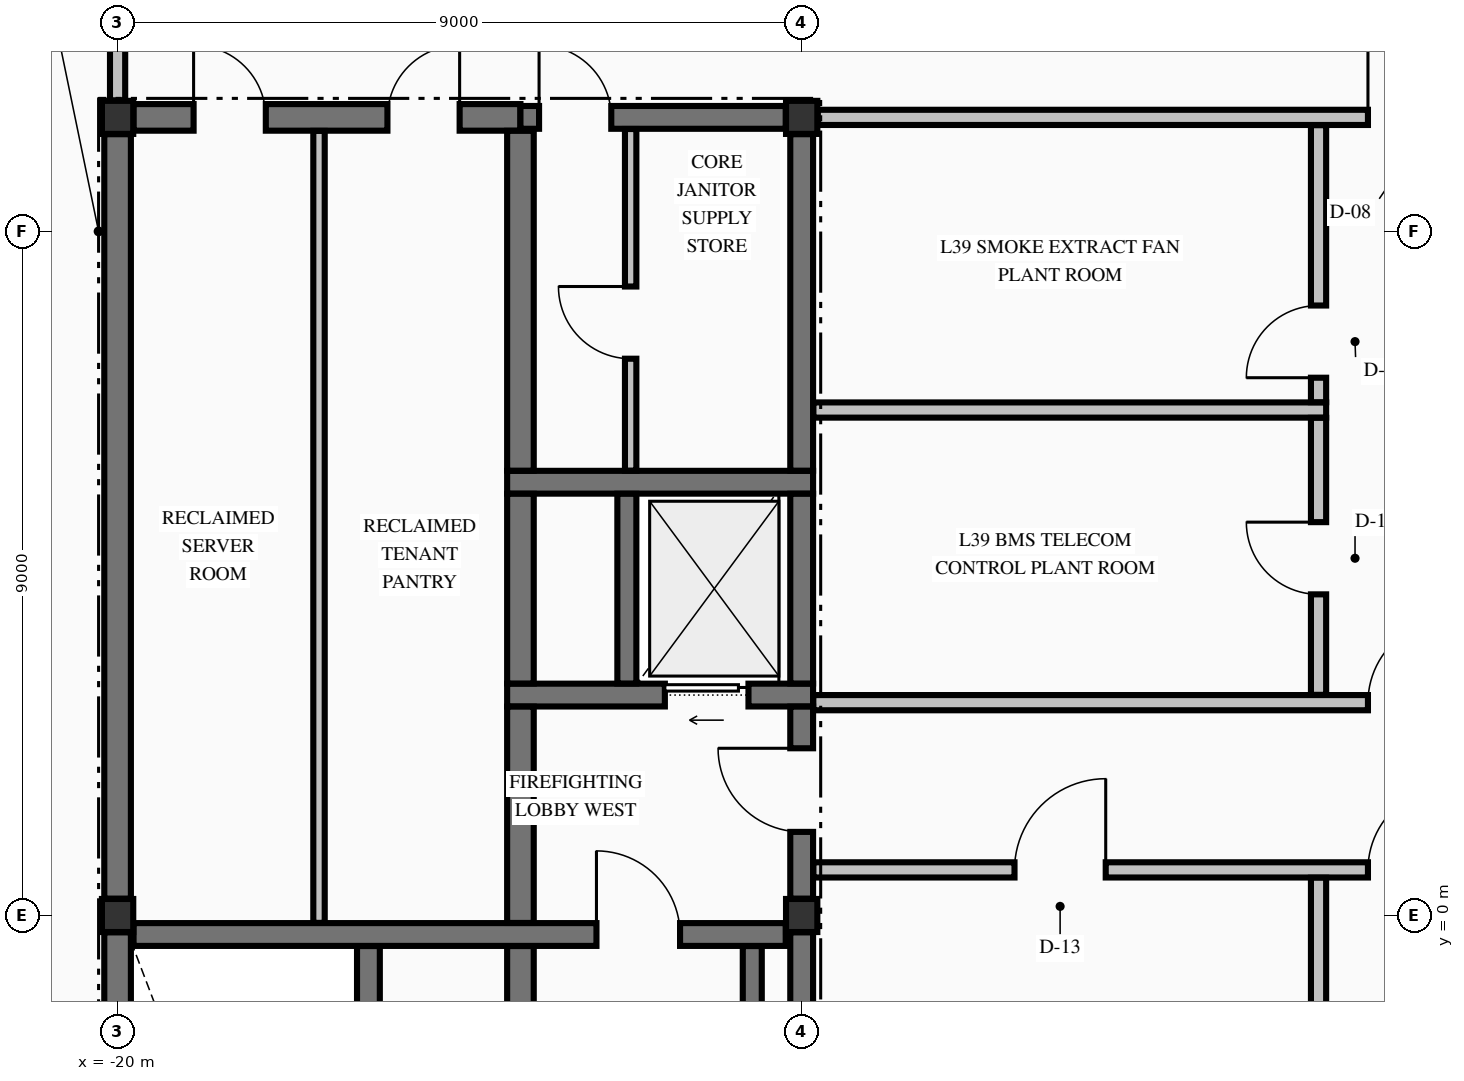
"""IFC4 building model, lengths in metres.
Left out: names, types, materials, properties, quantities, classifications, styles, units other than length and angle.
Written with IfcOpenShell. Run it as: python <this file> out.ifc"""

import sys

from ifc_helpers import new_model, si_unit, direction, frame, frame_2d, origin, origin_2d, place, context, subcontext, project, spatial, rectangle, i_section, extrude, element, fill, save


model = new_model("IFC4")
c1 = context("Model", 3, precision=1e-05, world=origin(), true_north=direction((0.0, 1.0)))
c2 = subcontext(c1, "Body", "Model", "MODEL_VIEW")
j1 = project(units=[si_unit("LENGTHUNIT", "METRE"), si_unit("PLANEANGLEUNIT", "RADIAN")], contexts=[c1])
p1 = place(None, origin())
s1 = spatial("IfcSite", under=j1, at=p1, CompositionType="ELEMENT")
p2 = place(p1, origin())
s2 = spatial("IfcBuilding", under=s1, at=p2, CompositionType="ELEMENT")
p3 = place(p2, frame((0.0, 0.0, 153.48)))
s3 = spatial("IfcBuildingStorey", under=s2, at=p3, CompositionType="ELEMENT", Elevation=153.48)
for number, where, z_axis, x_axis in (
    (1, (-20.0, 10.5, -0.425), (0.0, 0.0, 1.0), (1.0, 0.0, 0.0)),
    (2, (-11.0, 0.0, -0.425), (0.0, 0.0, 1.0), (1.0, 0.0, 0.0)),
    (3, (-11.0, 10.5, -0.425), (0.0, 0.0, 1.0), (1.0, 0.0, 0.0)),
    (4, (-20.0, 0.0, -0.425), (0.0, 0.0, 1.0), (1.0, 0.0, 0.0)),
):
    element("IfcColumn", number, at=place(p3, frame(where, z_axis=z_axis, x_axis=x_axis)), inside=s3, PredefinedType="COLUMN", context=c2, shape_type="SweptSolid", body=[
        extrude(i_section(OverallWidth=0.412, OverallDepth=0.435, WebThickness=0.036, FlangeThickness=0.058, FilletRadius=0.015, at=origin_2d()), origin(), (0.0, 0.0, 1.0), 4.76),
    ])
p4 = place(p3, frame((-19.79, -0.25, 0.0), z_axis=(0.0, 0.0, 1.0), x_axis=(1.0, 0.0, 0.0)))
e5 = element("IfcWall", 5, at=p4, inside=s3, PredefinedType="SHEAR", context=c2, shape_type="SweptSolid", body=[
    extrude(rectangle(XDim=8.58, YDim=0.3, at=frame_2d((4.29, 0.0))), origin(), (0.0, 0.0, 1.0), 4.335),
])
p5 = place(p4, frame((6.09, 0.0, 0.0)))
e6 = element("IfcOpeningElement", 6, at=p5, cuts=e5, PredefinedType="OPENING", context=c2, shape_type="SweptSolid", body=[
    extrude(rectangle(XDim=1.1, YDim=2.15, at=frame_2d((0.55, 1.075))), frame((0.0, 0.16, 0.0), z_axis=(0.0, -1.0, 0.0), x_axis=(1.0, 0.0, 0.0)), (0.0, 0.0, 1.0), 0.32),
])
p6 = place(p3, frame((-14.875, 2.9, 0.0), z_axis=(0.0, 0.0, 1.0), x_axis=(1.0, 0.0, 0.0)))
e7 = element("IfcWall", 7, at=p6, inside=s3, PredefinedType="SHEAR", context=c2, shape_type="SweptSolid", body=[
    extrude(rectangle(XDim=4.025, YDim=0.3, at=frame_2d((2.012, 0.0))), origin(), (0.0, 0.0, 1.0), 4.335),
])
p7 = place(p6, frame((2.075, 0.0, 0.0)))
e8 = element("IfcOpeningElement", 8, at=p7, cuts=e7, PredefinedType="OPENING", context=c2, shape_type="SweptSolid", body=[
    extrude(rectangle(XDim=1.1, YDim=2.2, at=frame_2d((0.55, 1.1))), frame((0.0, 0.16, 0.0), z_axis=(0.0, -1.0, 0.0), x_axis=(1.0, 0.0, 0.0)), (0.0, 0.0, 1.0), 0.32),
])
p8 = place(p3, frame((-14.875, 5.7, 0.0), z_axis=(0.0, 0.0, 1.0), x_axis=(1.0, 0.0, 0.0)))
e9 = element("IfcWall", 9, at=p8, inside=s3, PredefinedType="SHEAR", context=c2, shape_type="SweptSolid", body=[
    extrude(rectangle(XDim=4.025, YDim=0.3, at=frame_2d((2.012, 0.0))), origin(), (0.0, 0.0, 1.0), 4.335),
])
p9 = place(p3, frame((-19.79, 10.5, 0.0), z_axis=(0.0, 0.0, 1.0), x_axis=(1.0, 0.0, 0.0)))
e10 = element("IfcWall", 10, at=p9, inside=s3, PredefinedType="SHEAR", context=c2, shape_type="SweptSolid", body=[
    extrude(rectangle(XDim=5.09, YDim=0.35, at=frame_2d((2.545, 0.0))), origin(), (0.0, 0.0, 1.0), 4.335),
])
p10 = place(p9, frame((0.79, 0.0, 0.0)))
e11 = element("IfcOpeningElement", 11, at=p10, cuts=e10, PredefinedType="OPENING", context=c2, shape_type="SweptSolid", body=[
    extrude(rectangle(XDim=0.95, YDim=2.02, at=frame_2d((0.475, 1.01))), frame((0.0, 0.185, 0.0), z_axis=(0.0, -1.0, 0.0), x_axis=(1.0, 0.0, 0.0)), (0.0, 0.0, 1.0), 0.37),
])
p11 = place(p9, frame((3.34, 0.0, 0.0)))
e12 = element("IfcOpeningElement", 12, at=p11, cuts=e10, PredefinedType="OPENING", context=c2, shape_type="SweptSolid", body=[
    extrude(rectangle(XDim=0.95, YDim=2.02, at=frame_2d((0.475, 1.01))), frame((0.0, 0.185, 0.0), z_axis=(0.0, -1.0, 0.0), x_axis=(1.0, 0.0, 0.0)), (0.0, 0.0, 1.0), 0.37),
])
p12 = place(p3, frame((-14.7, 10.5, 0.0), z_axis=(0.0, 0.0, 1.0), x_axis=(1.0, 0.0, 0.0)))
e13 = element("IfcWall", 13, at=p12, inside=s3, PredefinedType="SHEAR", context=c2, shape_type="SweptSolid", body=[
    extrude(rectangle(XDim=3.49, YDim=0.3, at=frame_2d((1.745, 0.0))), origin(), (0.0, 0.0, 1.0), 4.335),
])
p13 = place(p12, frame((0.245, 0.0, 0.0)))
e14 = element("IfcOpeningElement", 14, at=p13, cuts=e13, PredefinedType="OPENING", context=c2, shape_type="SweptSolid", body=[
    extrude(rectangle(XDim=0.95, YDim=2.02, at=frame_2d((0.475, 1.01))), frame((0.0, 0.16, 0.0), z_axis=(0.0, -1.0, 0.0), x_axis=(1.0, 0.0, 0.0)), (0.0, 0.0, 1.0), 0.32),
])
p14 = place(p3, frame((-10.847, 0.6, 0.0), z_axis=(0.0, 0.0, 1.0), x_axis=(1.0, 0.0, 0.0)))
e15 = element("IfcWall", 15, at=p14, inside=s3, PredefinedType="PARTITIONING", context=c2, shape_type="SweptSolid", body=[
    extrude(rectangle(XDim=21.694, YDim=0.2, at=frame_2d((10.847, 0.0))), origin(), (0.0, 0.0, 1.0), 4.335),
])
p15 = place(p14, frame((7.297, 0.0, 0.0)))
e16 = element("IfcOpeningElement", 16, at=p15, cuts=e15, PredefinedType="OPENING", context=c2, shape_type="SweptSolid", body=[
    extrude(rectangle(XDim=1.1, YDim=2.15, at=frame_2d((0.55, 1.075))), frame((0.0, 0.11, 0.0), z_axis=(0.0, -1.0, 0.0), x_axis=(1.0, 0.0, 0.0)), (0.0, 0.0, 1.0), 0.22),
])
p16 = place(p14, frame((2.647, 0.0, 0.0)))
e17 = element("IfcOpeningElement", 17, at=p16, cuts=e15, PredefinedType="OPENING", context=c2, shape_type="SweptSolid", body=[
    extrude(rectangle(XDim=1.2, YDim=2.15, at=frame_2d((0.6, 1.075))), frame((0.0, 0.11, 0.0), z_axis=(0.0, -1.0, 0.0), x_axis=(1.0, 0.0, 0.0)), (0.0, 0.0, 1.0), 0.22),
])
p17 = place(p14, frame((14.847, 0.0, 0.0)))
e18 = element("IfcOpeningElement", 18, at=p17, cuts=e15, PredefinedType="OPENING", context=c2, shape_type="SweptSolid", body=[
    extrude(rectangle(XDim=1.2, YDim=2.15, at=frame_2d((0.6, 1.075))), frame((0.0, 0.11, 0.0), z_axis=(0.0, -1.0, 0.0), x_axis=(1.0, 0.0, 0.0)), (0.0, 0.0, 1.0), 0.22),
])
p18 = place(p3, frame((-10.847, 2.8, 0.0), z_axis=(0.0, 0.0, 1.0), x_axis=(1.0, 0.0, 0.0)))
e19 = element("IfcWall", 19, at=p18, inside=s3, PredefinedType="PARTITIONING", context=c2, shape_type="SweptSolid", body=[
    extrude(rectangle(XDim=21.694, YDim=0.2, at=frame_2d((10.847, 0.0))), origin(), (0.0, 0.0, 1.0), 4.335),
])
p19 = place(p18, frame((7.297, 0.0, 0.0)))
e20 = element("IfcOpeningElement", 20, at=p19, cuts=e19, PredefinedType="OPENING", context=c2, shape_type="SweptSolid", body=[
    extrude(rectangle(XDim=1.1, YDim=2.15, at=frame_2d((0.55, 1.075))), frame((0.0, 0.11, 0.0), z_axis=(0.0, -1.0, 0.0), x_axis=(1.0, 0.0, 0.0)), (0.0, 0.0, 1.0), 0.22),
])
p20 = place(p18, frame((17.497, 0.0, 0.0)))
e21 = element("IfcOpeningElement", 21, at=p20, cuts=e19, PredefinedType="OPENING", context=c2, shape_type="SweptSolid", body=[
    extrude(rectangle(XDim=1.1, YDim=2.15, at=frame_2d((0.55, 1.075))), frame((0.0, 0.11, 0.0), z_axis=(0.0, -1.0, 0.0), x_axis=(1.0, 0.0, 0.0)), (0.0, 0.0, 1.0), 0.22),
])
p21 = place(p3, frame((-10.847, 6.65, 0.0), z_axis=(0.0, 0.0, 1.0), x_axis=(1.0, 0.0, 0.0)))
e22 = element("IfcWall", 22, at=p21, inside=s3, PredefinedType="PARTITIONING", context=c2, shape_type="SweptSolid", body=[
    extrude(rectangle(XDim=6.747, YDim=0.2, at=frame_2d((3.374, 0.0))), origin(), (0.0, 0.0, 1.0), 4.335),
])
p22 = place(p3, frame((-10.788, 10.5, 0.0), z_axis=(0.0, 0.0, 1.0), x_axis=(1.0, 0.0, 0.0)))
e23 = element("IfcWall", 23, at=p22, inside=s3, PredefinedType="PARTITIONING", context=c2, shape_type="SweptSolid", body=[
    extrude(rectangle(XDim=21.576, YDim=0.2, at=frame_2d((10.788, 0.0))), origin(), (0.0, 0.0, 1.0), 4.335),
])
p23 = place(p22, frame((7.238, 0.0, 0.0)))
e24 = element("IfcOpeningElement", 24, at=p23, cuts=e23, PredefinedType="OPENING", context=c2, shape_type="SweptSolid", body=[
    extrude(rectangle(XDim=1.1, YDim=2.15, at=frame_2d((0.55, 1.075))), frame((0.0, 0.11, 0.0), z_axis=(0.0, -1.0, 0.0), x_axis=(1.0, 0.0, 0.0)), (0.0, 0.0, 1.0), 0.22),
])
p24 = place(p3, frame((-20.0, -9.729, 0.0), z_axis=(0.0, 0.0, 1.0), x_axis=(0.0, 1.0, 0.0)))
e25 = element("IfcWall", 25, at=p24, inside=s3, PredefinedType="SHEAR", context=c2, shape_type="SweptSolid", body=[
    extrude(rectangle(XDim=9.507, YDim=0.35, at=frame_2d((4.753, 0.0))), origin(), (0.0, 0.0, 1.0), 4.335),
])
p25 = place(p3, frame((-20.0, 0.221, 0.0), z_axis=(0.0, 0.0, 1.0), x_axis=(0.0, 1.0, 0.0)))
e26 = element("IfcWall", 26, at=p25, inside=s3, PredefinedType="SHEAR", context=c2, shape_type="SweptSolid", body=[
    extrude(rectangle(XDim=10.057, YDim=0.35, at=frame_2d((5.029, 0.0))), origin(), (0.0, 0.0, 1.0), 4.335),
])
p26 = place(p3, frame((-16.7, -9.773, 0.0), z_axis=(0.0, 0.0, 1.0), x_axis=(0.0, 1.0, 0.0)))
e27 = element("IfcWall", 27, at=p26, inside=s3, PredefinedType="SHEAR", context=c2, shape_type="SweptSolid", body=[
    extrude(rectangle(XDim=9.371, YDim=0.3, at=frame_2d((4.686, 0.0))), origin(), (0.0, 0.0, 1.0), 4.335),
])
p27 = place(p3, frame((-14.7, -9.773, 0.0), z_axis=(0.0, 0.0, 1.0), x_axis=(0.0, 1.0, 0.0)))
e28 = element("IfcWall", 28, at=p27, inside=s3, PredefinedType="SHEAR", context=c2, shape_type="SweptSolid", body=[
    extrude(rectangle(XDim=9.371, YDim=0.35, at=frame_2d((4.686, 0.0))), origin(), (0.0, 0.0, 1.0), 4.335),
])
p28 = place(p3, frame((-14.7, -0.098, 0.0), z_axis=(0.0, 0.0, 1.0), x_axis=(0.0, 1.0, 0.0)))
e29 = element("IfcWall", 29, at=p28, inside=s3, PredefinedType="SHEAR", context=c2, shape_type="SweptSolid", body=[
    extrude(rectangle(XDim=2.846, YDim=0.35, at=frame_2d((1.423, 0.0))), origin(), (0.0, 0.0, 1.0), 4.335),
])
p29 = place(p3, frame((-14.7, 3.052, 0.0), z_axis=(0.0, 0.0, 1.0), x_axis=(0.0, 1.0, 0.0)))
e30 = element("IfcWall", 30, at=p29, inside=s3, PredefinedType="SHEAR", context=c2, shape_type="SweptSolid", body=[
    extrude(rectangle(XDim=2.496, YDim=0.35, at=frame_2d((1.248, 0.0))), origin(), (0.0, 0.0, 1.0), 4.335),
])
p30 = place(p3, frame((-14.7, 5.852, 0.0), z_axis=(0.0, 0.0, 1.0), x_axis=(0.0, 1.0, 0.0)))
e31 = element("IfcWall", 31, at=p30, inside=s3, PredefinedType="SHEAR", context=c2, shape_type="SweptSolid", body=[
    extrude(rectangle(XDim=4.471, YDim=0.35, at=frame_2d((2.235, 0.0))), origin(), (0.0, 0.0, 1.0), 4.335),
])
p31 = place(p3, frame((-13.3, 3.052, 0.0), z_axis=(0.0, 0.0, 1.0), x_axis=(0.0, 1.0, 0.0)))
e32 = element("IfcWall", 32, at=p31, inside=s3, PredefinedType="SOLIDWALL", context=c2, shape_type="SweptSolid", body=[
    extrude(rectangle(XDim=2.496, YDim=0.25, at=frame_2d((1.248, 0.0))), origin(), (0.0, 0.0, 1.0), 4.335),
])
p32 = place(p3, frame((-11.65, -9.798, 0.0), z_axis=(0.0, 0.0, 1.0), x_axis=(0.0, 1.0, 0.0)))
e33 = element("IfcWall", 33, at=p32, inside=s3, PredefinedType="SOLIDWALL", context=c2, shape_type="SweptSolid", body=[
    extrude(rectangle(XDim=9.396, YDim=0.25, at=frame_2d((4.698, 0.0))), origin(), (0.0, 0.0, 1.0), 4.335),
])
p33 = place(p3, frame((-11.0, -9.729, 0.0), z_axis=(0.0, 0.0, 1.0), x_axis=(0.0, 1.0, 0.0)))
e34 = element("IfcWall", 34, at=p33, inside=s3, PredefinedType="SHEAR", context=c2, shape_type="SweptSolid", body=[
    extrude(rectangle(XDim=9.507, YDim=0.3, at=frame_2d((4.753, 0.0))), origin(), (0.0, 0.0, 1.0), 4.335),
])
p34 = place(p3, frame((-11.0, 0.221, 0.0), z_axis=(0.0, 0.0, 1.0), x_axis=(0.0, 1.0, 0.0)))
e35 = element("IfcWall", 35, at=p34, inside=s3, PredefinedType="SHEAR", context=c2, shape_type="SweptSolid", body=[
    extrude(rectangle(XDim=2.527, YDim=0.3, at=frame_2d((1.263, 0.0))), origin(), (0.0, 0.0, 1.0), 4.335),
])
p35 = place(p34, frame((0.878, 0.0, 0.0)))
e36 = element("IfcOpeningElement", 36, at=p35, cuts=e35, PredefinedType="OPENING", context=c2, shape_type="SweptSolid", body=[
    extrude(rectangle(XDim=1.1, YDim=2.15, at=frame_2d((0.55, 1.075))), frame((0.0, 0.16, 0.0), z_axis=(0.0, -1.0, 0.0), x_axis=(1.0, 0.0, 0.0)), (0.0, 0.0, 1.0), 0.32),
])
p36 = place(p3, frame((-11.0, 3.052, 0.0), z_axis=(0.0, 0.0, 1.0), x_axis=(0.0, 1.0, 0.0)))
e37 = element("IfcWall", 37, at=p36, inside=s3, PredefinedType="SHEAR", context=c2, shape_type="SweptSolid", body=[
    extrude(rectangle(XDim=2.496, YDim=0.3, at=frame_2d((1.248, 0.0))), origin(), (0.0, 0.0, 1.0), 4.335),
])
p37 = place(p3, frame((-11.0, 5.852, 0.0), z_axis=(0.0, 0.0, 1.0), x_axis=(0.0, 1.0, 0.0)))
e38 = element("IfcWall", 38, at=p37, inside=s3, PredefinedType="SHEAR", context=c2, shape_type="SweptSolid", body=[
    extrude(rectangle(XDim=4.427, YDim=0.3, at=frame_2d((2.213, 0.0))), origin(), (0.0, 0.0, 1.0), 4.335),
])
p38 = place(p3, frame((-20.0, 10.723, 0.0), z_axis=(0.0, 0.0, 1.0), x_axis=(0.0, 1.0, 0.0)))
e39 = element("IfcWall", 39, at=p38, inside=s3, PredefinedType="PARTITIONING", context=c2, shape_type="SweptSolid", body=[
    extrude(rectangle(XDim=1.974, YDim=0.2, at=frame_2d((0.987, 0.0))), origin(), (0.0, 0.0, 1.0), 2.127),
])
p39 = place(p3, frame((-17.35, -0.097, 0.0), z_axis=(0.0, 0.0, 1.0), x_axis=(0.0, 1.0, 0.0)))
e40 = element("IfcWall", 40, at=p39, inside=s3, PredefinedType="PARTITIONING", context=c2, shape_type="SweptSolid", body=[
    extrude(rectangle(XDim=10.419, YDim=0.15, at=frame_2d((5.209, 0.0))), origin(), (0.0, 0.0, 1.0), 4.335),
])
p40 = place(p3, frame((-13.25, 5.853, 0.0), z_axis=(0.0, 0.0, 1.0), x_axis=(0.0, 1.0, 0.0)))
e41 = element("IfcWall", 41, at=p40, inside=s3, PredefinedType="PARTITIONING", context=c2, shape_type="SweptSolid", body=[
    extrude(rectangle(XDim=4.494, YDim=0.15, at=frame_2d((2.247, 0.0))), origin(), (0.0, 0.0, 1.0), 4.335),
])
p41 = place(p40, frame((1.472, 0.0, 0.0)))
e42 = element("IfcOpeningElement", 42, at=p41, cuts=e41, PredefinedType="OPENING", context=c2, shape_type="SweptSolid", body=[
    extrude(rectangle(XDim=0.95, YDim=2.15, at=frame_2d((0.475, 1.075))), frame((0.0, 0.085, 0.0), z_axis=(0.0, -1.0, 0.0), x_axis=(1.0, 0.0, 0.0)), (0.0, 0.0, 1.0), 0.17),
])
p42 = place(p3, frame((-4.2, -9.847, 0.0), z_axis=(0.0, 0.0, 1.0), x_axis=(0.0, 1.0, 0.0)))
e43 = element("IfcWall", 43, at=p42, inside=s3, PredefinedType="PARTITIONING", context=c2, shape_type="SweptSolid", body=[
    extrude(rectangle(XDim=10.344, YDim=0.2, at=frame_2d((5.172, 0.0))), origin(), (0.0, 0.0, 1.0), 4.335),
])
p43 = place(p3, frame((-4.2, 2.903, 0.0), z_axis=(0.0, 0.0, 1.0), x_axis=(0.0, 1.0, 0.0)))
e44 = element("IfcWall", 44, at=p43, inside=s3, PredefinedType="PARTITIONING", context=c2, shape_type="SweptSolid", body=[
    extrude(rectangle(XDim=3.644, YDim=0.2, at=frame_2d((1.822, 0.0))), origin(), (0.0, 0.0, 1.0), 4.335),
])
p44 = place(p43, frame((1.322, 0.0, 0.0)))
e45 = element("IfcOpeningElement", 45, at=p44, cuts=e44, PredefinedType="OPENING", context=c2, shape_type="SweptSolid", body=[
    extrude(rectangle(XDim=0.95, YDim=2.15, at=frame_2d((0.475, 1.075))), frame((0.0, 0.11, 0.0), z_axis=(0.0, -1.0, 0.0), x_axis=(1.0, 0.0, 0.0)), (0.0, 0.0, 1.0), 0.22),
])
p45 = place(p3, frame((-4.2, 6.753, 0.0), z_axis=(0.0, 0.0, 1.0), x_axis=(0.0, 1.0, 0.0)))
e46 = element("IfcWall", 46, at=p45, inside=s3, PredefinedType="PARTITIONING", context=c2, shape_type="SweptSolid", body=[
    extrude(rectangle(XDim=3.644, YDim=0.2, at=frame_2d((1.822, 0.0))), origin(), (0.0, 0.0, 1.0), 4.335),
])
p46 = place(p45, frame((0.322, 0.0, 0.0)))
e47 = element("IfcOpeningElement", 47, at=p46, cuts=e46, PredefinedType="OPENING", context=c2, shape_type="SweptSolid", body=[
    extrude(rectangle(XDim=0.95, YDim=2.15, at=frame_2d((0.475, 1.075))), frame((0.0, 0.11, 0.0), z_axis=(0.0, -1.0, 0.0), x_axis=(1.0, 0.0, 0.0)), (0.0, 0.0, 1.0), 0.22),
])
p47 = place(p5, origin())
e48 = element("IfcDoor", 48, at=p47, inside=s3, OperationType="SINGLE_SWING_LEFT", PredefinedType="DOOR", context=c2, shape_type="SweptSolid", body=[
    extrude(rectangle(XDim=1.1, YDim=2.15, at=frame_2d((0.55, 1.075))), frame((0.0, 0.025, 0.0), z_axis=(0.0, -1.0, 0.0), x_axis=(1.0, 0.0, 0.0)), (0.0, 0.0, 1.0), 0.05),
])
fill(e6, e48)
p48 = place(p35, origin())
e49 = element("IfcDoor", 49, at=p48, inside=s3, OperationType="SINGLE_SWING_RIGHT", PredefinedType="DOOR", context=c2, shape_type="SweptSolid", body=[
    extrude(rectangle(XDim=1.1, YDim=2.15, at=frame_2d((0.55, 1.075))), frame((0.0, 0.025, 0.0), z_axis=(0.0, -1.0, 0.0), x_axis=(1.0, 0.0, 0.0)), (0.0, 0.0, 1.0), 0.05),
])
fill(e36, e49)
p49 = place(p7, origin())
e50 = element("IfcDoor", 50, at=p49, inside=s3, OperationType="SLIDING_TO_LEFT", PredefinedType="DOOR", context=c2, shape_type="SweptSolid", body=[
    extrude(rectangle(XDim=1.1, YDim=2.2, at=frame_2d((0.55, 1.1))), frame((0.0, 0.025, 0.0), z_axis=(0.0, -1.0, 0.0), x_axis=(1.0, 0.0, 0.0)), (0.0, 0.0, 1.0), 0.05),
])
fill(e8, e50)
p50 = place(p13, origin())
e51 = element("IfcDoor", 51, at=p50, inside=s3, OperationType="SINGLE_SWING_LEFT", PredefinedType="DOOR", context=c2, shape_type="SweptSolid", body=[
    extrude(rectangle(XDim=0.95, YDim=2.02, at=frame_2d((0.475, 1.01))), frame((0.0, 0.025, 0.0), z_axis=(0.0, -1.0, 0.0), x_axis=(1.0, 0.0, 0.0)), (0.0, 0.0, 1.0), 0.05),
])
fill(e14, e51)
p51 = place(p41, origin())
e52 = element("IfcDoor", 52, at=p51, inside=s3, OperationType="SINGLE_SWING_RIGHT", PredefinedType="DOOR", context=c2, shape_type="SweptSolid", body=[
    extrude(rectangle(XDim=0.95, YDim=2.15, at=frame_2d((0.475, 1.075))), frame((0.0, 0.025, 0.0), z_axis=(0.0, -1.0, 0.0), x_axis=(1.0, 0.0, 0.0)), (0.0, 0.0, 1.0), 0.05),
])
fill(e42, e52)
p52 = place(p10, origin())
e53 = element("IfcDoor", 53, at=p52, inside=s3, OperationType="SINGLE_SWING_LEFT", PredefinedType="DOOR", context=c2, shape_type="SweptSolid", body=[
    extrude(rectangle(XDim=0.95, YDim=2.02, at=frame_2d((0.475, 1.01))), frame((0.0, 0.025, 0.0), z_axis=(0.0, -1.0, 0.0), x_axis=(1.0, 0.0, 0.0)), (0.0, 0.0, 1.0), 0.05),
])
fill(e11, e53)
p53 = place(p11, origin())
e54 = element("IfcDoor", 54, at=p53, inside=s3, OperationType="SINGLE_SWING_RIGHT", PredefinedType="DOOR", context=c2, shape_type="SweptSolid", body=[
    extrude(rectangle(XDim=0.95, YDim=2.02, at=frame_2d((0.475, 1.01))), frame((0.0, 0.025, 0.0), z_axis=(0.0, -1.0, 0.0), x_axis=(1.0, 0.0, 0.0)), (0.0, 0.0, 1.0), 0.05),
])
fill(e12, e54)
p54 = place(p19, origin())
e55 = element("IfcDoor", 55, at=p54, inside=s3, OperationType="SINGLE_SWING_RIGHT", PredefinedType="DOOR", context=c2, shape_type="SweptSolid", body=[
    extrude(rectangle(XDim=1.1, YDim=2.15, at=frame_2d((0.55, 1.075))), frame((0.0, 0.025, 0.0), z_axis=(0.0, -1.0, 0.0), x_axis=(1.0, 0.0, 0.0)), (0.0, 0.0, 1.0), 0.05),
])
fill(e20, e55)
p55 = place(p23, origin())
e56 = element("IfcDoor", 56, at=p55, inside=s3, OperationType="SINGLE_SWING_LEFT", PredefinedType="DOOR", context=c2, shape_type="SweptSolid", body=[
    extrude(rectangle(XDim=1.1, YDim=2.15, at=frame_2d((0.55, 1.075))), frame((0.0, 0.025, 0.0), z_axis=(0.0, -1.0, 0.0), x_axis=(1.0, 0.0, 0.0)), (0.0, 0.0, 1.0), 0.05),
])
fill(e24, e56)
p56 = place(p15, origin())
e57 = element("IfcDoor", 57, at=p56, inside=s3, OperationType="SINGLE_SWING_RIGHT", PredefinedType="DOOR", context=c2, shape_type="SweptSolid", body=[
    extrude(rectangle(XDim=1.1, YDim=2.15, at=frame_2d((0.55, 1.075))), frame((0.0, 0.025, 0.0), z_axis=(0.0, -1.0, 0.0), x_axis=(1.0, 0.0, 0.0)), (0.0, 0.0, 1.0), 0.05),
])
fill(e16, e57)
p57 = place(p16, origin())
e58 = element("IfcDoor", 58, at=p57, inside=s3, OperationType="SINGLE_SWING_RIGHT", PredefinedType="DOOR", context=c2, shape_type="SweptSolid", body=[
    extrude(rectangle(XDim=1.2, YDim=2.15, at=frame_2d((0.6, 1.075))), frame((0.0, 0.025, 0.0), z_axis=(0.0, -1.0, 0.0), x_axis=(1.0, 0.0, 0.0)), (0.0, 0.0, 1.0), 0.05),
])
fill(e17, e58)
p58 = place(p44, origin())
e59 = element("IfcDoor", 59, at=p58, inside=s3, OperationType="SINGLE_SWING_RIGHT", PredefinedType="DOOR", context=c2, shape_type="SweptSolid", body=[
    extrude(rectangle(XDim=0.95, YDim=2.15, at=frame_2d((0.475, 1.075))), frame((0.0, 0.025, 0.0), z_axis=(0.0, -1.0, 0.0), x_axis=(1.0, 0.0, 0.0)), (0.0, 0.0, 1.0), 0.05),
])
fill(e45, e59)
p59 = place(p46, origin())
e60 = element("IfcDoor", 60, at=p59, inside=s3, OperationType="SINGLE_SWING_LEFT", PredefinedType="DOOR", context=c2, shape_type="SweptSolid", body=[
    extrude(rectangle(XDim=0.95, YDim=2.15, at=frame_2d((0.475, 1.075))), frame((0.0, 0.025, 0.0), z_axis=(0.0, -1.0, 0.0), x_axis=(1.0, 0.0, 0.0)), (0.0, 0.0, 1.0), 0.05),
])
fill(e47, e60)
save(model, sys.argv[1])
